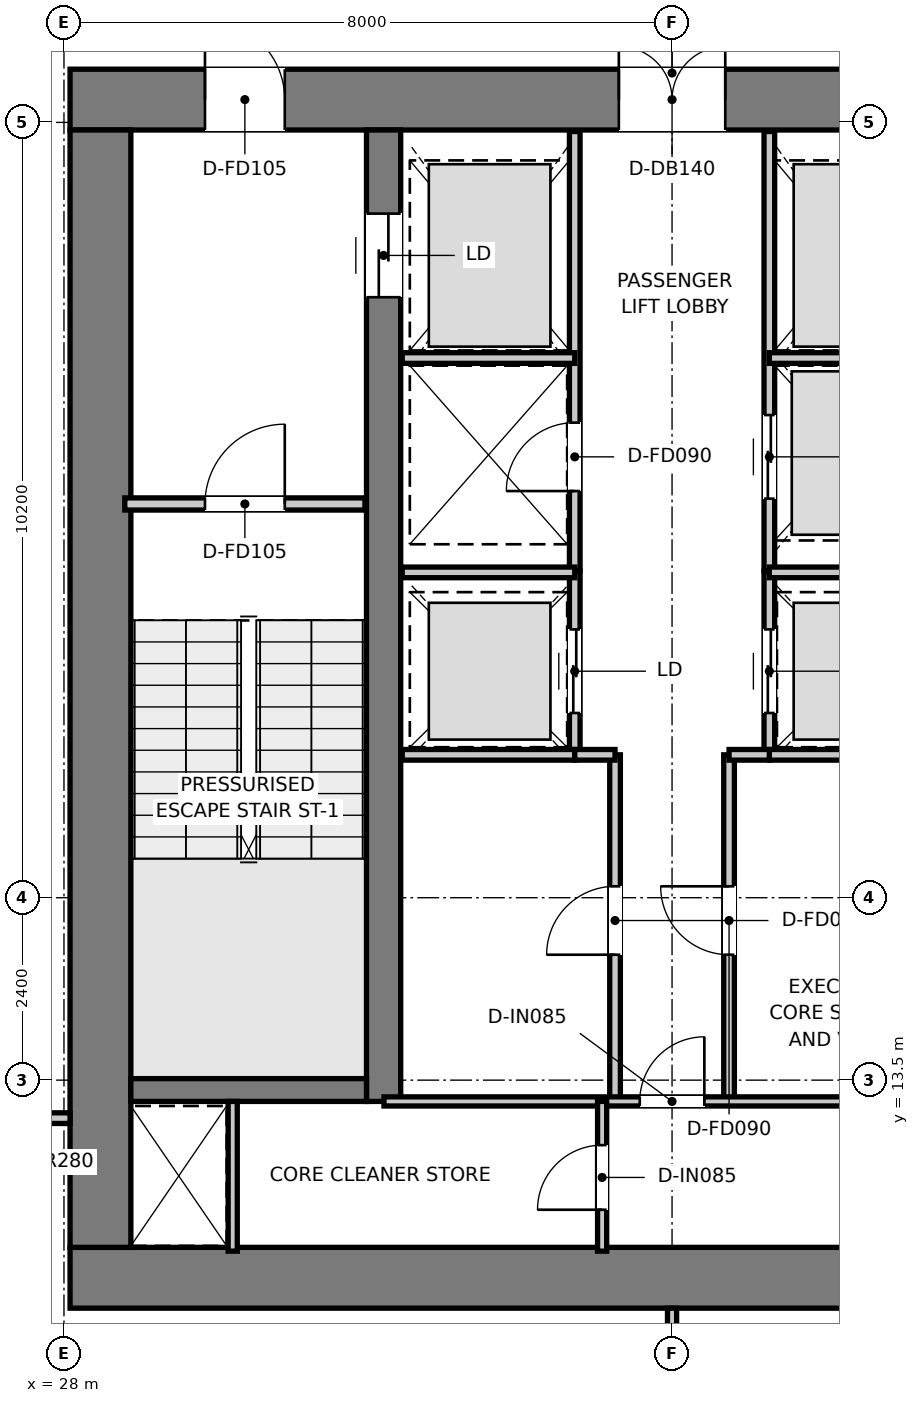
"""IFC4 building model, lengths in metres.
Left out: names, types, materials, properties, quantities, classifications, styles, units other than length and angle.
Written with IfcOpenShell. Run it as: python <this file> out.ifc"""

import sys

from ifc_helpers import new_model, si_unit, direction, frame, frame_2d, origin, place, context, subcontext, project, spatial, rectangle, extrude, element, fill, save


model = new_model("IFC4")
c1 = context("Model", 3, precision=1e-05, world=origin(), true_north=direction((0.0, 1.0)))
c2 = subcontext(c1, "Body", "Model", "MODEL_VIEW")
j1 = project(units=[si_unit("LENGTHUNIT", "METRE"), si_unit("PLANEANGLEUNIT", "RADIAN")], contexts=[c1])
p1 = place(None, origin())
s1 = spatial("IfcSite", under=j1, at=p1, CompositionType="ELEMENT")
p2 = place(p1, origin())
s2 = spatial("IfcBuilding", under=s1, at=p2, CompositionType="ELEMENT")
p3 = place(p2, frame((0.0, 0.0, 323.75)))
s3 = spatial("IfcBuildingStorey", under=s2, at=p3, CompositionType="ELEMENT", Elevation=323.75)
p4 = place(p3, frame((28.08, 10.9, 0.0), z_axis=(0.0, 0.0, 1.0), x_axis=(1.0, 0.0, 0.0)))
e1 = element("IfcWall", 1, at=p4, inside=s3, PredefinedType="SHEAR", context=c2, shape_type="SweptSolid", body=[
    extrude(rectangle(XDim=15.84, YDim=0.8, at=frame_2d((7.92, 0.0))), origin(), (0.0, 0.0, 1.0), 3.95),
])
p5 = place(p3, frame((28.08, 26.4, 0.0), z_axis=(0.0, 0.0, 1.0), x_axis=(1.0, 0.0, 0.0)))
e2 = element("IfcWall", 2, at=p5, inside=s3, PredefinedType="SHEAR", context=c2, shape_type="SweptSolid", body=[
    extrude(rectangle(XDim=15.84, YDim=0.8, at=frame_2d((7.92, 0.0))), origin(), (0.0, 0.0, 1.0), 3.95),
])
p6 = place(p5, frame((7.22, 0.0, 0.0)))
e3 = element("IfcOpeningElement", 3, at=p6, cuts=e2, PredefinedType="OPENING", context=c2, shape_type="SweptSolid", body=[
    extrude(rectangle(XDim=1.4, YDim=2.2, at=frame_2d((0.7, 1.1))), frame((0.0, 0.41, 0.0), z_axis=(0.0, -1.0, 0.0), x_axis=(1.0, 0.0, 0.0)), (0.0, 0.0, 1.0), 0.82),
])
p7 = place(p5, frame((1.775, 0.0, 0.0)))
e4 = element("IfcOpeningElement", 4, at=p7, cuts=e2, PredefinedType="OPENING", context=c2, shape_type="SweptSolid", body=[
    extrude(rectangle(XDim=1.05, YDim=2.1, at=frame_2d((0.525, 1.05))), frame((0.0, 0.41, 0.0), z_axis=(0.0, -1.0, 0.0), x_axis=(1.0, 0.0, 0.0)), (0.0, 0.0, 1.0), 0.82),
])
p8 = place(p5, frame((13.015, 0.0, 0.0)))
e5 = element("IfcOpeningElement", 5, at=p8, cuts=e2, PredefinedType="OPENING", context=c2, shape_type="SweptSolid", body=[
    extrude(rectangle(XDim=1.05, YDim=2.1, at=frame_2d((0.525, 1.05))), frame((0.0, 0.41, 0.0), z_axis=(0.0, -1.0, 0.0), x_axis=(1.0, 0.0, 0.0)), (0.0, 0.0, 1.0), 0.82),
])
p9 = place(p3, frame((28.48, 11.3, 0.0), z_axis=(0.0, 0.0, 1.0), x_axis=(0.0, 1.0, 0.0)))
e6 = element("IfcWall", 6, at=p9, inside=s3, PredefinedType="SHEAR", context=c2, shape_type="SweptSolid", body=[
    extrude(rectangle(XDim=14.7, YDim=0.8, at=frame_2d((7.35, 0.0))), origin(), (0.0, 0.0, 1.0), 3.95),
])
p10 = place(p3, frame((32.205, 13.22, 0.0), z_axis=(0.0, 0.0, 1.0), x_axis=(0.0, 1.0, 0.0)))
e7 = element("IfcWall", 7, at=p10, inside=s3, PredefinedType="SHEAR", context=c2, shape_type="SweptSolid", body=[
    extrude(rectangle(XDim=12.78, YDim=0.45, at=frame_2d((6.39, 0.0))), origin(), (0.0, 0.0, 1.0), 3.95),
])
p11 = place(p10, frame((10.58, 0.0, 0.0)))
e8 = element("IfcOpeningElement", 8, at=p11, cuts=e7, PredefinedType="OPENING", context=c2, shape_type="SweptSolid", body=[
    extrude(rectangle(XDim=1.1, YDim=2.15, at=frame_2d((0.55, 1.075))), frame((0.0, 0.235, 0.0), z_axis=(0.0, -1.0, 0.0), x_axis=(1.0, 0.0, 0.0)), (0.0, 0.0, 1.0), 0.47),
])
p12 = place(p3, frame((28.88, 13.37, 0.0), z_axis=(0.0, 0.0, 1.0), x_axis=(1.0, 0.0, 0.0)))
e9 = element("IfcWall", 9, at=p12, inside=s3, PredefinedType="SHEAR", context=c2, shape_type="SweptSolid", body=[
    extrude(rectangle(XDim=3.1, YDim=0.3, at=frame_2d((1.55, 0.0))), origin(), (0.0, 0.0, 1.0), 3.95),
])
p13 = place(p3, frame((28.8, 21.08, 0.0), z_axis=(0.0, 0.0, 1.0), x_axis=(1.0, 0.0, 0.0)))
e10 = element("IfcWall", 10, at=p13, inside=s3, PredefinedType="PARTITIONING", context=c2, shape_type="SweptSolid", body=[
    extrude(rectangle(XDim=3.16, YDim=0.16, at=frame_2d((1.58, 0.0))), origin(), (0.0, 0.0, 1.0), 3.67),
])
p14 = place(p13, frame((1.055, 0.0, 0.0)))
e11 = element("IfcOpeningElement", 11, at=p14, cuts=e10, PredefinedType="OPENING", context=c2, shape_type="SweptSolid", body=[
    extrude(rectangle(XDim=1.05, YDim=2.1, at=frame_2d((0.525, 1.05))), frame((0.0, 0.09, 0.0), z_axis=(0.0, -1.0, 0.0), x_axis=(1.0, 0.0, 0.0)), (0.0, 0.0, 1.0), 0.18),
])
p15 = place(p3, frame((34.72, 20.2, 0.0), z_axis=(0.0, 0.0, 1.0), x_axis=(0.0, 1.0, 0.0)))
e12 = element("IfcWall", 12, at=p15, inside=s3, PredefinedType="PARTITIONING", context=c2, shape_type="SweptSolid", body=[
    extrude(rectangle(XDim=5.78, YDim=0.14, at=frame_2d((2.89, 0.0))), origin(), (0.0, 0.0, 1.0), 2.82),
])
p16 = place(p15, frame((1.05, 0.0, 0.0)))
e13 = element("IfcOpeningElement", 13, at=p16, cuts=e12, PredefinedType="OPENING", context=c2, shape_type="SweptSolid", body=[
    extrude(rectangle(XDim=0.9, YDim=2.1, at=frame_2d((0.45, 1.05))), frame((0.0, 0.08, 0.0), z_axis=(0.0, -1.0, 0.0), x_axis=(1.0, 0.0, 0.0)), (0.0, 0.0, 1.0), 0.16),
])
p17 = place(p3, frame((37.28, 20.2, 0.0), z_axis=(0.0, 0.0, 1.0), x_axis=(0.0, 1.0, 0.0)))
e14 = element("IfcWall", 14, at=p17, inside=s3, PredefinedType="PARTITIONING", context=c2, shape_type="SweptSolid", body=[
    extrude(rectangle(XDim=5.78, YDim=0.14, at=frame_2d((2.89, 0.0))), origin(), (0.0, 0.0, 1.0), 2.82),
])
p18 = place(p17, frame((0.95, 0.0, 0.0)))
e15 = element("IfcOpeningElement", 15, at=p18, cuts=e14, PredefinedType="OPENING", context=c2, shape_type="SweptSolid", body=[
    extrude(rectangle(XDim=1.1, YDim=2.15, at=frame_2d((0.55, 1.075))), frame((0.0, 0.08, 0.0), z_axis=(0.0, -1.0, 0.0), x_axis=(1.0, 0.0, 0.0)), (0.0, 0.0, 1.0), 0.16),
])
for number, where, z_axis, x_axis in (
    (16, (32.45, 23.0, 0.0), (0.0, 0.0, 1.0), (1.0, 0.0, 0.0)),
    (17, (37.28, 23.0, 0.0), (0.0, 0.0, 1.0), (1.0, 0.0, 0.0)),
):
    element("IfcWall", number, at=place(p3, frame(where, z_axis=z_axis, x_axis=x_axis)), inside=s3, PredefinedType="PARTITIONING", context=c2, shape_type="SweptSolid", body=[
        extrude(rectangle(XDim=2.27, YDim=0.14, at=frame_2d((1.135, 0.0))), origin(), (0.0, 0.0, 1.0), 2.82),
    ])
p19 = place(p3, frame((34.72, 17.78, 0.0), z_axis=(0.0, 0.0, 1.0), x_axis=(0.0, 1.0, 0.0)))
e18 = element("IfcWall", 18, at=p19, inside=s3, PredefinedType="PARTITIONING", context=c2, shape_type="SweptSolid", body=[
    extrude(rectangle(XDim=2.42, YDim=0.14, at=frame_2d((1.21, 0.0))), origin(), (0.0, 0.0, 1.0), 3.67),
])
p20 = place(p19, frame((0.55, 0.0, 0.0)))
e19 = element("IfcOpeningElement", 19, at=p20, cuts=e18, PredefinedType="OPENING", context=c2, shape_type="SweptSolid", body=[
    extrude(rectangle(XDim=1.1, YDim=2.15, at=frame_2d((0.55, 1.075))), frame((0.0, 0.08, 0.0), z_axis=(0.0, -1.0, 0.0), x_axis=(1.0, 0.0, 0.0)), (0.0, 0.0, 1.0), 0.16),
])
p21 = place(p3, frame((37.28, 17.78, 0.0), z_axis=(0.0, 0.0, 1.0), x_axis=(0.0, 1.0, 0.0)))
e20 = element("IfcWall", 20, at=p21, inside=s3, PredefinedType="PARTITIONING", context=c2, shape_type="SweptSolid", body=[
    extrude(rectangle(XDim=2.42, YDim=0.14, at=frame_2d((1.21, 0.0))), origin(), (0.0, 0.0, 1.0), 3.67),
])
p22 = place(p21, frame((0.55, 0.0, 0.0)))
e21 = element("IfcOpeningElement", 21, at=p22, cuts=e20, PredefinedType="OPENING", context=c2, shape_type="SweptSolid", body=[
    extrude(rectangle(XDim=1.1, YDim=2.15, at=frame_2d((0.55, 1.075))), frame((0.0, 0.08, 0.0), z_axis=(0.0, -1.0, 0.0), x_axis=(1.0, 0.0, 0.0)), (0.0, 0.0, 1.0), 0.16),
])
for number, where, z_axis, x_axis in (
    (22, (32.45, 17.78, 0.0), (0.0, 0.0, 1.0), (1.0, 0.0, 0.0)),
    (23, (32.45, 20.18, 0.0), (0.0, 0.0, 1.0), (1.0, 0.0, 0.0)),
    (24, (37.28, 17.78, 0.0), (0.0, 0.0, 1.0), (1.0, 0.0, 0.0)),
    (25, (37.28, 20.18, 0.0), (0.0, 0.0, 1.0), (1.0, 0.0, 0.0)),
):
    element("IfcWall", number, at=place(p3, frame(where, z_axis=z_axis, x_axis=x_axis)), inside=s3, PredefinedType="PARTITIONING", context=c2, shape_type="SweptSolid", body=[
        extrude(rectangle(XDim=2.27, YDim=0.14, at=frame_2d((1.135, 0.0))), origin(), (0.0, 0.0, 1.0), 3.67),
    ])
p23 = place(p3, frame((35.25, 13.22, 0.0), z_axis=(0.0, 0.0, 1.0), x_axis=(0.0, 1.0, 0.0)))
e26 = element("IfcWall", 26, at=p23, inside=s3, PredefinedType="PARTITIONING", context=c2, shape_type="SweptSolid", body=[
    extrude(rectangle(XDim=4.56, YDim=0.14, at=frame_2d((2.28, 0.0))), origin(), (0.0, 0.0, 1.0), 3.67),
])
p24 = place(p23, frame((1.93, 0.0, 0.0)))
e27 = element("IfcOpeningElement", 27, at=p24, cuts=e26, PredefinedType="OPENING", context=c2, shape_type="SweptSolid", body=[
    extrude(rectangle(XDim=0.9, YDim=2.1, at=frame_2d((0.45, 1.05))), frame((0.0, 0.08, 0.0), z_axis=(0.0, -1.0, 0.0), x_axis=(1.0, 0.0, 0.0)), (0.0, 0.0, 1.0), 0.16),
])
p25 = place(p3, frame((34.72, 17.78, 0.0), z_axis=(0.0, 0.0, 1.0), x_axis=(1.0, 0.0, 0.0)))
e28 = element("IfcWall", 28, at=p25, inside=s3, PredefinedType="PARTITIONING", context=c2, shape_type="SweptSolid", body=[
    extrude(rectangle(XDim=0.53, YDim=0.14, at=frame_2d((0.265, 0.0))), origin(), (0.0, 0.0, 1.0), 3.67),
])
p26 = place(p3, frame((36.75, 13.22, 0.0), z_axis=(0.0, 0.0, 1.0), x_axis=(0.0, 1.0, 0.0)))
e29 = element("IfcWall", 29, at=p26, inside=s3, PredefinedType="PARTITIONING", context=c2, shape_type="SweptSolid", body=[
    extrude(rectangle(XDim=4.56, YDim=0.14, at=frame_2d((2.28, 0.0))), origin(), (0.0, 0.0, 1.0), 3.67),
])
p27 = place(p26, frame((1.93, 0.0, 0.0)))
e30 = element("IfcOpeningElement", 30, at=p27, cuts=e29, PredefinedType="OPENING", context=c2, shape_type="SweptSolid", body=[
    extrude(rectangle(XDim=0.9, YDim=2.1, at=frame_2d((0.45, 1.05))), frame((0.0, 0.08, 0.0), z_axis=(0.0, -1.0, 0.0), x_axis=(1.0, 0.0, 0.0)), (0.0, 0.0, 1.0), 0.16),
])
p28 = place(p3, frame((36.75, 17.78, 0.0), z_axis=(0.0, 0.0, 1.0), x_axis=(1.0, 0.0, 0.0)))
e31 = element("IfcWall", 31, at=p28, inside=s3, PredefinedType="PARTITIONING", context=c2, shape_type="SweptSolid", body=[
    extrude(rectangle(XDim=0.53, YDim=0.14, at=frame_2d((0.265, 0.0))), origin(), (0.0, 0.0, 1.0), 3.67),
])
p29 = place(p3, frame((30.22, 11.25, 0.0), z_axis=(0.0, 0.0, 1.0), x_axis=(0.0, 1.0, 0.0)))
e32 = element("IfcWall", 32, at=p29, inside=s3, PredefinedType="PARTITIONING", context=c2, shape_type="SweptSolid", body=[
    extrude(rectangle(XDim=1.97, YDim=0.12, at=frame_2d((0.985, 0.0))), origin(), (0.0, 0.0, 1.0), 3.67),
])
p30 = place(p3, frame((32.21, 13.22, 0.0), z_axis=(0.0, 0.0, 1.0), x_axis=(1.0, 0.0, 0.0)))
e33 = element("IfcWall", 33, at=p30, inside=s3, PredefinedType="PARTITIONING", context=c2, shape_type="SweptSolid", body=[
    extrude(rectangle(XDim=7.58, YDim=0.12, at=frame_2d((3.79, 0.0))), origin(), (0.0, 0.0, 1.0), 3.67),
])
p31 = place(p30, frame((3.365, 0.0, 0.0)))
e34 = element("IfcOpeningElement", 34, at=p31, cuts=e33, PredefinedType="OPENING", context=c2, shape_type="SweptSolid", body=[
    extrude(rectangle(XDim=0.85, YDim=2.1, at=frame_2d((0.425, 1.05))), frame((0.0, 0.07, 0.0), z_axis=(0.0, -1.0, 0.0), x_axis=(1.0, 0.0, 0.0)), (0.0, 0.0, 1.0), 0.14),
])
p32 = place(p3, frame((35.08, 11.25, 0.0), z_axis=(0.0, 0.0, 1.0), x_axis=(0.0, 1.0, 0.0)))
e35 = element("IfcWall", 35, at=p32, inside=s3, PredefinedType="PARTITIONING", context=c2, shape_type="SweptSolid", body=[
    extrude(rectangle(XDim=1.97, YDim=0.12, at=frame_2d((0.985, 0.0))), origin(), (0.0, 0.0, 1.0), 3.67),
])
p33 = place(p32, frame((0.545, 0.0, 0.0)))
e36 = element("IfcOpeningElement", 36, at=p33, cuts=e35, PredefinedType="OPENING", context=c2, shape_type="SweptSolid", body=[
    extrude(rectangle(XDim=0.85, YDim=2.1, at=frame_2d((0.425, 1.05))), frame((0.0, 0.07, 0.0), z_axis=(0.0, -1.0, 0.0), x_axis=(1.0, 0.0, 0.0)), (0.0, 0.0, 1.0), 0.14),
])
p34 = place(p3, frame((21.14, 13.0, 0.0), z_axis=(0.0, 0.0, 1.0), x_axis=(1.0, 0.0, 0.0)))
e37 = element("IfcWall", 37, at=p34, inside=s3, PredefinedType="PARTITIONING", context=c2, shape_type="SweptSolid", body=[
    extrude(rectangle(XDim=6.94, YDim=0.14, at=frame_2d((3.47, 0.0))), origin(), (0.0, 0.0, 1.0), 3.18),
])
p35 = place(p34, frame((5.635, 0.0, 0.0)))
e38 = element("IfcOpeningElement", 38, at=p35, cuts=e37, PredefinedType="OPENING", context=c2, shape_type="SweptSolid", body=[
    extrude(rectangle(XDim=0.85, YDim=2.1, at=frame_2d((0.425, 1.05))), frame((0.0, 0.08, 0.0), z_axis=(0.0, -1.0, 0.0), x_axis=(1.0, 0.0, 0.0)), (0.0, 0.0, 1.0), 0.16),
])
p36 = place(p3, frame((36.0, 6.305, 0.0), z_axis=(0.0, 0.0, 1.0), x_axis=(0.0, 1.0, 0.0)))
e39 = element("IfcWall", 39, at=p36, inside=s3, PredefinedType="PARTITIONING", context=c2, shape_type="SweptSolid", body=[
    extrude(rectangle(XDim=4.195, YDim=0.12, at=frame_2d((2.098, 0.0))), origin(), (0.0, 0.0, 1.0), 3.67),
])
p37 = place(p14, origin())
e40 = element("IfcDoor", 40, at=p37, inside=s3, OperationType="SINGLE_SWING_RIGHT", PredefinedType="DOOR", context=c2, shape_type="SweptSolid", body=[
    extrude(rectangle(XDim=1.05, YDim=2.1, at=frame_2d((0.525, 1.05))), frame((0.0, 0.025, 0.0), z_axis=(0.0, -1.0, 0.0), x_axis=(1.0, 0.0, 0.0)), (0.0, 0.0, 1.0), 0.05),
])
fill(e11, e40)
p38 = place(p6, origin())
e41 = element("IfcDoor", 41, at=p38, inside=s3, OperationType="DOUBLE_DOOR_SINGLE_SWING", PredefinedType="DOOR", context=c2, shape_type="SweptSolid", body=[
    extrude(rectangle(XDim=1.4, YDim=2.2, at=frame_2d((0.7, 1.1))), frame((0.0, 0.025, 0.0), z_axis=(0.0, -1.0, 0.0), x_axis=(1.0, 0.0, 0.0)), (0.0, 0.0, 1.0), 0.05),
])
fill(e3, e41)
p39 = place(p7, origin())
e42 = element("IfcDoor", 42, at=p39, inside=s3, OperationType="SINGLE_SWING_LEFT", PredefinedType="DOOR", context=c2, shape_type="SweptSolid", body=[
    extrude(rectangle(XDim=1.05, YDim=2.1, at=frame_2d((0.525, 1.05))), frame((0.0, 0.025, 0.0), z_axis=(0.0, -1.0, 0.0), x_axis=(1.0, 0.0, 0.0)), (0.0, 0.0, 1.0), 0.05),
])
fill(e4, e42)
p40 = place(p11, origin())
e43 = element("IfcDoor", 43, at=p40, inside=s3, OperationType="DOUBLE_DOOR_SLIDING", PredefinedType="DOOR", context=c2, shape_type="SweptSolid", body=[
    extrude(rectangle(XDim=1.1, YDim=2.15, at=frame_2d((0.55, 1.075))), frame((0.0, 0.025, 0.0), z_axis=(0.0, -1.0, 0.0), x_axis=(1.0, 0.0, 0.0)), (0.0, 0.0, 1.0), 0.05),
])
fill(e8, e43)
p41 = place(p16, origin())
e44 = element("IfcDoor", 44, at=p41, inside=s3, OperationType="SINGLE_SWING_LEFT", PredefinedType="DOOR", context=c2, shape_type="SweptSolid", body=[
    extrude(rectangle(XDim=0.9, YDim=2.1, at=frame_2d((0.45, 1.05))), frame((0.0, 0.025, 0.0), z_axis=(0.0, -1.0, 0.0), x_axis=(1.0, 0.0, 0.0)), (0.0, 0.0, 1.0), 0.05),
])
fill(e13, e44)
p42 = place(p18, origin())
e45 = element("IfcDoor", 45, at=p42, inside=s3, OperationType="DOUBLE_DOOR_SLIDING", PredefinedType="DOOR", context=c2, shape_type="SweptSolid", body=[
    extrude(rectangle(XDim=1.1, YDim=2.15, at=frame_2d((0.55, 1.075))), frame((0.0, 0.025, 0.0), z_axis=(0.0, -1.0, 0.0), x_axis=(1.0, 0.0, 0.0)), (0.0, 0.0, 1.0), 0.05),
])
fill(e15, e45)
p43 = place(p20, origin())
e46 = element("IfcDoor", 46, at=p43, inside=s3, OperationType="DOUBLE_DOOR_SLIDING", PredefinedType="DOOR", context=c2, shape_type="SweptSolid", body=[
    extrude(rectangle(XDim=1.1, YDim=2.15, at=frame_2d((0.55, 1.075))), frame((0.0, 0.025, 0.0), z_axis=(0.0, -1.0, 0.0), x_axis=(1.0, 0.0, 0.0)), (0.0, 0.0, 1.0), 0.05),
])
fill(e19, e46)
p44 = place(p22, origin())
e47 = element("IfcDoor", 47, at=p44, inside=s3, OperationType="DOUBLE_DOOR_SLIDING", PredefinedType="DOOR", context=c2, shape_type="SweptSolid", body=[
    extrude(rectangle(XDim=1.1, YDim=2.15, at=frame_2d((0.55, 1.075))), frame((0.0, 0.025, 0.0), z_axis=(0.0, -1.0, 0.0), x_axis=(1.0, 0.0, 0.0)), (0.0, 0.0, 1.0), 0.05),
])
fill(e21, e47)
p45 = place(p24, origin())
e48 = element("IfcDoor", 48, at=p45, inside=s3, OperationType="SINGLE_SWING_LEFT", PredefinedType="DOOR", context=c2, shape_type="SweptSolid", body=[
    extrude(rectangle(XDim=0.9, YDim=2.1, at=frame_2d((0.45, 1.05))), frame((0.0, 0.025, 0.0), z_axis=(0.0, -1.0, 0.0), x_axis=(1.0, 0.0, 0.0)), (0.0, 0.0, 1.0), 0.05),
])
fill(e27, e48)
p46 = place(p27, origin())
e49 = element("IfcDoor", 49, at=p46, inside=s3, OperationType="SINGLE_SWING_RIGHT", PredefinedType="DOOR", context=c2, shape_type="SweptSolid", body=[
    extrude(rectangle(XDim=0.9, YDim=2.1, at=frame_2d((0.45, 1.05))), frame((0.0, 0.025, 0.0), z_axis=(0.0, -1.0, 0.0), x_axis=(1.0, 0.0, 0.0)), (0.0, 0.0, 1.0), 0.05),
])
fill(e30, e49)
p47 = place(p31, origin())
e50 = element("IfcDoor", 50, at=p47, inside=s3, OperationType="SINGLE_SWING_RIGHT", PredefinedType="DOOR", context=c2, shape_type="SweptSolid", body=[
    extrude(rectangle(XDim=0.85, YDim=2.1, at=frame_2d((0.425, 1.05))), frame((0.0, 0.025, 0.0), z_axis=(0.0, -1.0, 0.0), x_axis=(1.0, 0.0, 0.0)), (0.0, 0.0, 1.0), 0.05),
])
fill(e34, e50)
p48 = place(p33, origin())
e51 = element("IfcDoor", 51, at=p48, inside=s3, OperationType="SINGLE_SWING_LEFT", PredefinedType="DOOR", context=c2, shape_type="SweptSolid", body=[
    extrude(rectangle(XDim=0.85, YDim=2.1, at=frame_2d((0.425, 1.05))), frame((0.0, 0.025, 0.0), z_axis=(0.0, -1.0, 0.0), x_axis=(1.0, 0.0, 0.0)), (0.0, 0.0, 1.0), 0.05),
])
fill(e36, e51)
save(model, sys.argv[1])
